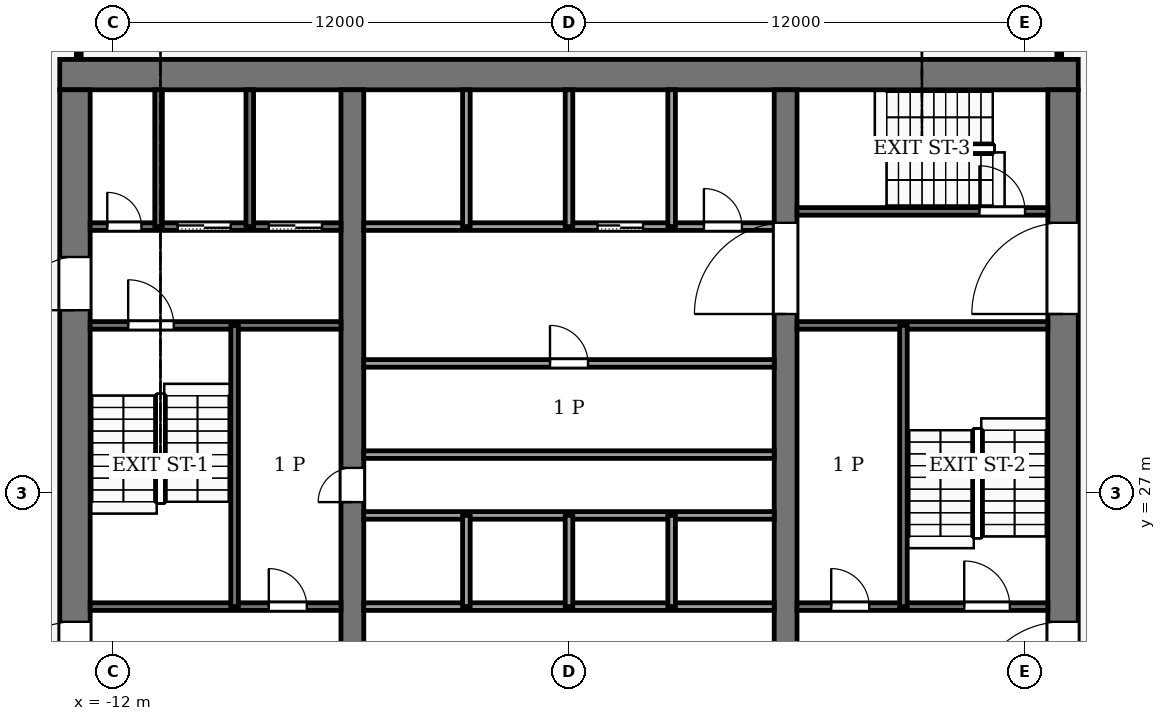
"""IFC4 building model, lengths in metres.
Left out: names, types, materials, properties, quantities, classifications, styles, units other than length and angle.
Written with IfcOpenShell. Run it as: python <this file> out.ifc"""

import sys

from ifc_helpers import new_model, si_unit, direction, frame, frame_2d, origin, place, context, subcontext, project, spatial, rectangle, extrude, element, fill, save


model = new_model("IFC4")
c1 = context("Model", 3, precision=1e-05, world=origin(), true_north=direction((0.0, 1.0)))
c2 = subcontext(c1, "Body", "Model", "MODEL_VIEW")
j1 = project(units=[si_unit("LENGTHUNIT", "METRE"), si_unit("PLANEANGLEUNIT", "RADIAN")], contexts=[c1])
p1 = place(None, origin())
s1 = spatial("IfcSite", under=j1, at=p1, CompositionType="ELEMENT")
p2 = place(p1, origin())
s2 = spatial("IfcBuilding", under=s1, at=p2, CompositionType="ELEMENT")
p3 = place(p2, frame((0.0, 0.0, 282.0)))
s3 = spatial("IfcBuildingStorey", under=s2, at=p3, CompositionType="ELEMENT", Elevation=282.0)
p4 = place(p3, frame((-13.4, 38.0, -0.25), z_axis=(0.0, 0.0, 1.0), x_axis=(1.0, 0.0, 0.0)))
e1 = element("IfcWall", 1, at=p4, inside=s3, PredefinedType="SHEAR", context=c2, shape_type="SweptSolid", body=[
    extrude(rectangle(XDim=26.8, YDim=0.8, at=frame_2d((13.4, 0.0))), origin(), (0.0, 0.0, 1.0), 7.12),
])
p5 = place(p3, frame((-13.0, 18.4, -0.25), z_axis=(0.0, 0.0, 1.0), x_axis=(0.0, 1.0, 0.0)))
e2 = element("IfcWall", 2, at=p5, inside=s3, PredefinedType="SHEAR", context=c2, shape_type="SweptSolid", body=[
    extrude(rectangle(XDim=19.2, YDim=0.8, at=frame_2d((9.6, 0.0))), origin(), (0.0, 0.0, 1.0), 7.12),
])
p6 = place(p5, frame((2.8, 0.0, 0.25)))
e3 = element("IfcOpeningElement", 3, at=p6, cuts=e2, PredefinedType="OPENING", context=c2, shape_type="SweptSolid", body=[
    extrude(rectangle(XDim=2.4, YDim=2.4, at=frame_2d((1.2, 1.2))), frame((0.0, 0.41, 0.0), z_axis=(0.0, -1.0, 0.0), x_axis=(1.0, 0.0, 0.0)), (0.0, 0.0, 1.0), 0.82),
])
p7 = place(p5, frame((13.4, 0.0, 0.25)))
e4 = element("IfcOpeningElement", 4, at=p7, cuts=e2, PredefinedType="OPENING", context=c2, shape_type="SweptSolid", body=[
    extrude(rectangle(XDim=1.4, YDim=2.2, at=frame_2d((0.7, 1.1))), frame((0.0, 0.41, 0.0), z_axis=(0.0, -1.0, 0.0), x_axis=(1.0, 0.0, 0.0)), (0.0, 0.0, 1.0), 0.82),
])
p8 = place(p3, frame((13.0, 18.4, -0.25), z_axis=(0.0, 0.0, 1.0), x_axis=(0.0, 1.0, 0.0)))
e5 = element("IfcWall", 5, at=p8, inside=s3, PredefinedType="SHEAR", context=c2, shape_type="SweptSolid", body=[
    extrude(rectangle(XDim=19.2, YDim=0.8, at=frame_2d((9.6, 0.0))), origin(), (0.0, 0.0, 1.0), 7.12),
])
p9 = place(p8, frame((2.8, 0.0, 0.25)))
e6 = element("IfcOpeningElement", 6, at=p9, cuts=e5, PredefinedType="OPENING", context=c2, shape_type="SweptSolid", body=[
    extrude(rectangle(XDim=2.4, YDim=2.4, at=frame_2d((1.2, 1.2))), frame((0.0, 0.41, 0.0), z_axis=(0.0, -1.0, 0.0), x_axis=(1.0, 0.0, 0.0)), (0.0, 0.0, 1.0), 0.82),
])
p10 = place(p8, frame((13.3, 0.0, 0.25)))
e7 = element("IfcOpeningElement", 7, at=p10, cuts=e5, PredefinedType="OPENING", context=c2, shape_type="SweptSolid", body=[
    extrude(rectangle(XDim=2.4, YDim=2.4, at=frame_2d((1.2, 1.2))), frame((0.0, 0.41, 0.0), z_axis=(0.0, -1.0, 0.0), x_axis=(1.0, 0.0, 0.0)), (0.0, 0.0, 1.0), 0.82),
])
p11 = place(p3, frame((-5.7, 18.4, -0.25), z_axis=(0.0, 0.0, 1.0), x_axis=(0.0, 1.0, 0.0)))
e8 = element("IfcWall", 8, at=p11, inside=s3, PredefinedType="SHEAR", context=c2, shape_type="SweptSolid", body=[
    extrude(rectangle(XDim=19.2, YDim=0.6, at=frame_2d((9.6, 0.0))), origin(), (0.0, 0.0, 1.0), 7.12),
])
p12 = place(p11, frame((8.35, 0.0, 0.25)))
e9 = element("IfcOpeningElement", 9, at=p12, cuts=e8, PredefinedType="OPENING", context=c2, shape_type="SweptSolid", body=[
    extrude(rectangle(XDim=0.9, YDim=2.1, at=frame_2d((0.45, 1.05))), frame((0.0, 0.31, 0.0), z_axis=(0.0, -1.0, 0.0), x_axis=(1.0, 0.0, 0.0)), (0.0, 0.0, 1.0), 0.62),
])
p13 = place(p3, frame((5.7, 18.4, -0.25), z_axis=(0.0, 0.0, 1.0), x_axis=(0.0, 1.0, 0.0)))
e10 = element("IfcWall", 10, at=p13, inside=s3, PredefinedType="SHEAR", context=c2, shape_type="SweptSolid", body=[
    extrude(rectangle(XDim=19.2, YDim=0.6, at=frame_2d((9.6, 0.0))), origin(), (0.0, 0.0, 1.0), 7.12),
])
p14 = place(p13, frame((13.3, 0.0, 0.25)))
e11 = element("IfcOpeningElement", 11, at=p14, cuts=e10, PredefinedType="OPENING", context=c2, shape_type="SweptSolid", body=[
    extrude(rectangle(XDim=2.4, YDim=2.4, at=frame_2d((1.2, 1.2))), frame((0.0, 0.31, 0.0), z_axis=(0.0, -1.0, 0.0), x_axis=(1.0, 0.0, 0.0)), (0.0, 0.0, 1.0), 0.62),
])
p15 = place(p3, frame((-12.6, 24.0, 0.0), z_axis=(0.0, 0.0, 1.0), x_axis=(1.0, 0.0, 0.0)))
e12 = element("IfcWall", 12, at=p15, inside=s3, PredefinedType="PARTITIONING", context=c2, shape_type="SweptSolid", body=[
    extrude(rectangle(XDim=6.6, YDim=0.2, at=frame_2d((3.3, 0.0))), origin(), (0.0, 0.0, 1.0), 6.87),
])
p16 = place(p15, frame((4.7, 0.0, 0.0)))
e13 = element("IfcOpeningElement", 13, at=p16, cuts=e12, PredefinedType="OPENING", context=c2, shape_type="SweptSolid", body=[
    extrude(rectangle(XDim=1.0, YDim=2.1, at=frame_2d((0.5, 1.05))), frame((0.0, 0.11, 0.0), z_axis=(0.0, -1.0, 0.0), x_axis=(1.0, 0.0, 0.0)), (0.0, 0.0, 1.0), 0.22),
])
p17 = place(p3, frame((-5.4, 24.0, 0.0), z_axis=(0.0, 0.0, 1.0), x_axis=(1.0, 0.0, 0.0)))
e14 = element("IfcWall", 14, at=p17, inside=s3, PredefinedType="PARTITIONING", context=c2, shape_type="SweptSolid", body=[
    extrude(rectangle(XDim=10.8, YDim=0.2, at=frame_2d((5.4, 0.0))), origin(), (0.0, 0.0, 1.0), 6.87),
])
p18 = place(p3, frame((6.0, 24.0, 0.0), z_axis=(0.0, 0.0, 1.0), x_axis=(1.0, 0.0, 0.0)))
e15 = element("IfcWall", 15, at=p18, inside=s3, PredefinedType="PARTITIONING", context=c2, shape_type="SweptSolid", body=[
    extrude(rectangle(XDim=6.6, YDim=0.2, at=frame_2d((3.3, 0.0))), origin(), (0.0, 0.0, 1.0), 6.87),
])
p19 = place(p18, frame((0.9, 0.0, 0.0)))
e16 = element("IfcOpeningElement", 16, at=p19, cuts=e15, PredefinedType="OPENING", context=c2, shape_type="SweptSolid", body=[
    extrude(rectangle(XDim=1.0, YDim=2.1, at=frame_2d((0.5, 1.05))), frame((0.0, 0.11, 0.0), z_axis=(0.0, -1.0, 0.0), x_axis=(1.0, 0.0, 0.0)), (0.0, 0.0, 1.0), 0.22),
])
p20 = place(p18, frame((4.4, 0.0, 0.0)))
e17 = element("IfcOpeningElement", 17, at=p20, cuts=e15, PredefinedType="OPENING", context=c2, shape_type="SweptSolid", body=[
    extrude(rectangle(XDim=1.2, YDim=2.2, at=frame_2d((0.6, 1.1))), frame((0.0, 0.11, 0.0), z_axis=(0.0, -1.0, 0.0), x_axis=(1.0, 0.0, 0.0)), (0.0, 0.0, 1.0), 0.22),
])
for number, where, z_axis, x_axis in (
    (18, (-5.4, 26.4, 0.0), (0.0, 0.0, 1.0), (1.0, 0.0, 0.0)),
    (19, (-5.4, 28.0, 0.0), (0.0, 0.0, 1.0), (1.0, 0.0, 0.0)),
):
    element("IfcWall", number, at=place(p3, frame(where, z_axis=z_axis, x_axis=x_axis)), inside=s3, PredefinedType="PARTITIONING", context=c2, shape_type="SweptSolid", body=[
        extrude(rectangle(XDim=10.8, YDim=0.2, at=frame_2d((5.4, 0.0))), origin(), (0.0, 0.0, 1.0), 6.87),
    ])
p21 = place(p3, frame((-5.4, 30.4, 0.0), z_axis=(0.0, 0.0, 1.0), x_axis=(1.0, 0.0, 0.0)))
e20 = element("IfcWall", 20, at=p21, inside=s3, PredefinedType="PARTITIONING", context=c2, shape_type="SweptSolid", body=[
    extrude(rectangle(XDim=10.8, YDim=0.2, at=frame_2d((5.4, 0.0))), origin(), (0.0, 0.0, 1.0), 6.87),
])
p22 = place(p21, frame((4.9, 0.0, 0.0)))
e21 = element("IfcOpeningElement", 21, at=p22, cuts=e20, PredefinedType="OPENING", context=c2, shape_type="SweptSolid", body=[
    extrude(rectangle(XDim=1.0, YDim=2.1, at=frame_2d((0.5, 1.05))), frame((0.0, 0.11, 0.0), z_axis=(0.0, -1.0, 0.0), x_axis=(1.0, 0.0, 0.0)), (0.0, 0.0, 1.0), 0.22),
])
p23 = place(p3, frame((-12.6, 31.4, 0.0), z_axis=(0.0, 0.0, 1.0), x_axis=(1.0, 0.0, 0.0)))
e22 = element("IfcWall", 22, at=p23, inside=s3, PredefinedType="PARTITIONING", context=c2, shape_type="SweptSolid", body=[
    extrude(rectangle(XDim=6.6, YDim=0.2, at=frame_2d((3.3, 0.0))), origin(), (0.0, 0.0, 1.0), 6.87),
])
p24 = place(p23, frame((1.0, 0.0, 0.0)))
e23 = element("IfcOpeningElement", 23, at=p24, cuts=e22, PredefinedType="OPENING", context=c2, shape_type="SweptSolid", body=[
    extrude(rectangle(XDim=1.2, YDim=2.2, at=frame_2d((0.6, 1.1))), frame((0.0, 0.11, 0.0), z_axis=(0.0, -1.0, 0.0), x_axis=(1.0, 0.0, 0.0)), (0.0, 0.0, 1.0), 0.22),
])
p25 = place(p3, frame((6.0, 31.4, 0.0), z_axis=(0.0, 0.0, 1.0), x_axis=(1.0, 0.0, 0.0)))
e24 = element("IfcWall", 24, at=p25, inside=s3, PredefinedType="PARTITIONING", context=c2, shape_type="SweptSolid", body=[
    extrude(rectangle(XDim=6.6, YDim=0.2, at=frame_2d((3.3, 0.0))), origin(), (0.0, 0.0, 1.0), 6.87),
])
p26 = place(p3, frame((-12.6, 34.0, 0.0), z_axis=(0.0, 0.0, 1.0), x_axis=(1.0, 0.0, 0.0)))
e25 = element("IfcWall", 25, at=p26, inside=s3, PredefinedType="PARTITIONING", context=c2, shape_type="SweptSolid", body=[
    extrude(rectangle(XDim=6.6, YDim=0.2, at=frame_2d((3.3, 0.0))), origin(), (0.0, 0.0, 1.0), 6.87),
])
p27 = place(p26, frame((4.7, 0.0, 0.0)))
e26 = element("IfcOpeningElement", 26, at=p27, cuts=e25, PredefinedType="OPENING", context=c2, shape_type="SweptSolid", body=[
    extrude(rectangle(XDim=1.4, YDim=2.2, at=frame_2d((0.7, 1.1))), frame((0.0, 0.11, 0.0), z_axis=(0.0, -1.0, 0.0), x_axis=(1.0, 0.0, 0.0)), (0.0, 0.0, 1.0), 0.22),
])
p28 = place(p26, frame((2.3, 0.0, 0.0)))
e27 = element("IfcOpeningElement", 27, at=p28, cuts=e25, PredefinedType="OPENING", context=c2, shape_type="SweptSolid", body=[
    extrude(rectangle(XDim=1.4, YDim=2.2, at=frame_2d((0.7, 1.1))), frame((0.0, 0.11, 0.0), z_axis=(0.0, -1.0, 0.0), x_axis=(1.0, 0.0, 0.0)), (0.0, 0.0, 1.0), 0.22),
])
p29 = place(p26, frame((0.45, 0.0, 0.0)))
e28 = element("IfcOpeningElement", 28, at=p29, cuts=e25, PredefinedType="OPENING", context=c2, shape_type="SweptSolid", body=[
    extrude(rectangle(XDim=0.9, YDim=2.1, at=frame_2d((0.45, 1.05))), frame((0.0, 0.11, 0.0), z_axis=(0.0, -1.0, 0.0), x_axis=(1.0, 0.0, 0.0)), (0.0, 0.0, 1.0), 0.22),
])
p30 = place(p3, frame((-5.4, 34.0, 0.0), z_axis=(0.0, 0.0, 1.0), x_axis=(1.0, 0.0, 0.0)))
e29 = element("IfcWall", 29, at=p30, inside=s3, PredefinedType="PARTITIONING", context=c2, shape_type="SweptSolid", body=[
    extrude(rectangle(XDim=10.8, YDim=0.2, at=frame_2d((5.4, 0.0))), origin(), (0.0, 0.0, 1.0), 6.87),
])
p31 = place(p30, frame((6.15, 0.0, 0.0)))
e30 = element("IfcOpeningElement", 30, at=p31, cuts=e29, PredefinedType="OPENING", context=c2, shape_type="SweptSolid", body=[
    extrude(rectangle(XDim=1.2, YDim=2.2, at=frame_2d((0.6, 1.1))), frame((0.0, 0.11, 0.0), z_axis=(0.0, -1.0, 0.0), x_axis=(1.0, 0.0, 0.0)), (0.0, 0.0, 1.0), 0.22),
])
p32 = place(p30, frame((8.95, 0.0, 0.0)))
e31 = element("IfcOpeningElement", 31, at=p32, cuts=e29, PredefinedType="OPENING", context=c2, shape_type="SweptSolid", body=[
    extrude(rectangle(XDim=1.0, YDim=2.1, at=frame_2d((0.5, 1.05))), frame((0.0, 0.11, 0.0), z_axis=(0.0, -1.0, 0.0), x_axis=(1.0, 0.0, 0.0)), (0.0, 0.0, 1.0), 0.22),
])
p33 = place(p3, frame((6.0, 34.4, 0.0), z_axis=(0.0, 0.0, 1.0), x_axis=(1.0, 0.0, 0.0)))
e32 = element("IfcWall", 32, at=p33, inside=s3, PredefinedType="PARTITIONING", context=c2, shape_type="SweptSolid", body=[
    extrude(rectangle(XDim=6.6, YDim=0.2, at=frame_2d((3.3, 0.0))), origin(), (0.0, 0.0, 1.0), 6.87),
])
p34 = place(p33, frame((4.8, 0.0, 0.0)))
e33 = element("IfcOpeningElement", 33, at=p34, cuts=e32, PredefinedType="OPENING", context=c2, shape_type="SweptSolid", body=[
    extrude(rectangle(XDim=1.2, YDim=2.2, at=frame_2d((0.6, 1.1))), frame((0.0, 0.11, 0.0), z_axis=(0.0, -1.0, 0.0), x_axis=(1.0, 0.0, 0.0)), (0.0, 0.0, 1.0), 0.22),
])
p35 = place(p3, frame((-10.8, 34.0, 0.0), z_axis=(0.0, 0.0, 1.0), x_axis=(0.0, 1.0, 0.0)))
e34 = element("IfcWall", 34, at=p35, inside=s3, PredefinedType="PARTITIONING", context=c2, shape_type="SweptSolid", body=[
    extrude(rectangle(XDim=3.6, YDim=0.2, at=frame_2d((1.8, 0.0))), origin(), (0.0, 0.0, 1.0), 6.87),
])
p36 = place(p3, frame((-8.8, 24.0, 0.0), z_axis=(0.0, 0.0, 1.0), x_axis=(0.0, 1.0, 0.0)))
e35 = element("IfcWall", 35, at=p36, inside=s3, PredefinedType="PARTITIONING", context=c2, shape_type="SweptSolid", body=[
    extrude(rectangle(XDim=7.4, YDim=0.2, at=frame_2d((3.7, 0.0))), origin(), (0.0, 0.0, 1.0), 6.87),
])
p37 = place(p3, frame((-8.4, 34.0, 0.0), z_axis=(0.0, 0.0, 1.0), x_axis=(0.0, 1.0, 0.0)))
e36 = element("IfcWall", 36, at=p37, inside=s3, PredefinedType="PARTITIONING", context=c2, shape_type="SweptSolid", body=[
    extrude(rectangle(XDim=3.6, YDim=0.2, at=frame_2d((1.8, 0.0))), origin(), (0.0, 0.0, 1.0), 6.87),
])
p38 = place(p3, frame((-2.7, 24.0, 0.0), z_axis=(0.0, 0.0, 1.0), x_axis=(0.0, 1.0, 0.0)))
e37 = element("IfcWall", 37, at=p38, inside=s3, PredefinedType="PARTITIONING", context=c2, shape_type="SweptSolid", body=[
    extrude(rectangle(XDim=2.4, YDim=0.2, at=frame_2d((1.2, 0.0))), origin(), (0.0, 0.0, 1.0), 6.87),
])
p39 = place(p3, frame((-2.7, 34.0, 0.0), z_axis=(0.0, 0.0, 1.0), x_axis=(0.0, 1.0, 0.0)))
e38 = element("IfcWall", 38, at=p39, inside=s3, PredefinedType="PARTITIONING", context=c2, shape_type="SweptSolid", body=[
    extrude(rectangle(XDim=3.6, YDim=0.2, at=frame_2d((1.8, 0.0))), origin(), (0.0, 0.0, 1.0), 6.87),
])
p40 = place(p3, frame((0.0, 24.0, 0.0), z_axis=(0.0, 0.0, 1.0), x_axis=(0.0, 1.0, 0.0)))
e39 = element("IfcWall", 39, at=p40, inside=s3, PredefinedType="PARTITIONING", context=c2, shape_type="SweptSolid", body=[
    extrude(rectangle(XDim=2.4, YDim=0.2, at=frame_2d((1.2, 0.0))), origin(), (0.0, 0.0, 1.0), 6.87),
])
p41 = place(p3, frame((0.0, 34.0, 0.0), z_axis=(0.0, 0.0, 1.0), x_axis=(0.0, 1.0, 0.0)))
e40 = element("IfcWall", 40, at=p41, inside=s3, PredefinedType="PARTITIONING", context=c2, shape_type="SweptSolid", body=[
    extrude(rectangle(XDim=3.6, YDim=0.2, at=frame_2d((1.8, 0.0))), origin(), (0.0, 0.0, 1.0), 6.87),
])
p42 = place(p3, frame((2.7, 24.0, 0.0), z_axis=(0.0, 0.0, 1.0), x_axis=(0.0, 1.0, 0.0)))
e41 = element("IfcWall", 41, at=p42, inside=s3, PredefinedType="PARTITIONING", context=c2, shape_type="SweptSolid", body=[
    extrude(rectangle(XDim=2.4, YDim=0.2, at=frame_2d((1.2, 0.0))), origin(), (0.0, 0.0, 1.0), 6.87),
])
p43 = place(p3, frame((2.7, 34.0, 0.0), z_axis=(0.0, 0.0, 1.0), x_axis=(0.0, 1.0, 0.0)))
e42 = element("IfcWall", 42, at=p43, inside=s3, PredefinedType="PARTITIONING", context=c2, shape_type="SweptSolid", body=[
    extrude(rectangle(XDim=3.6, YDim=0.2, at=frame_2d((1.8, 0.0))), origin(), (0.0, 0.0, 1.0), 6.87),
])
p44 = place(p3, frame((8.8, 24.0, 0.0), z_axis=(0.0, 0.0, 1.0), x_axis=(0.0, 1.0, 0.0)))
e43 = element("IfcWall", 43, at=p44, inside=s3, PredefinedType="PARTITIONING", context=c2, shape_type="SweptSolid", body=[
    extrude(rectangle(XDim=7.4, YDim=0.2, at=frame_2d((3.7, 0.0))), origin(), (0.0, 0.0, 1.0), 6.87),
])
for number, where, z_axis, x_axis in (
    (44, (12.9, 38.45, 0.0), (0.0, 0.0, 1.0), (0.0, 1.0, 0.0)),
    (45, (-12.9, 66.958, 0.0), (0.0, 0.0, 1.0), (0.0, -1.0, 0.0)),
):
    element("IfcWall", number, at=place(p3, frame(where, z_axis=z_axis, x_axis=x_axis)), inside=s3, PredefinedType="PARTITIONING", context=c2, shape_type="SweptSolid", body=[
        extrude(rectangle(XDim=28.508, YDim=0.125, at=frame_2d((14.254, 0.0))), origin(), (0.0, 0.0, 1.0), 6.35),
    ])
p45 = place(p31, origin())
e46 = element("IfcDoor", 46, at=p45, inside=s3, OperationType="SLIDING_TO_LEFT", PredefinedType="DOOR", context=c2, shape_type="SweptSolid", body=[
    extrude(rectangle(XDim=1.2, YDim=2.2, at=frame_2d((0.6, 1.1))), frame((0.0, 0.025, 0.0), z_axis=(0.0, -1.0, 0.0), x_axis=(1.0, 0.0, 0.0)), (0.0, 0.0, 1.0), 0.05),
])
fill(e30, e46)
p46 = place(p27, origin())
e47 = element("IfcDoor", 47, at=p46, inside=s3, OperationType="SLIDING_TO_LEFT", PredefinedType="DOOR", context=c2, shape_type="SweptSolid", body=[
    extrude(rectangle(XDim=1.4, YDim=2.2, at=frame_2d((0.7, 1.1))), frame((0.0, 0.025, 0.0), z_axis=(0.0, -1.0, 0.0), x_axis=(1.0, 0.0, 0.0)), (0.0, 0.0, 1.0), 0.05),
])
fill(e26, e47)
p47 = place(p28, origin())
e48 = element("IfcDoor", 48, at=p47, inside=s3, OperationType="SLIDING_TO_LEFT", PredefinedType="DOOR", context=c2, shape_type="SweptSolid", body=[
    extrude(rectangle(XDim=1.4, YDim=2.2, at=frame_2d((0.7, 1.1))), frame((0.0, 0.025, 0.0), z_axis=(0.0, -1.0, 0.0), x_axis=(1.0, 0.0, 0.0)), (0.0, 0.0, 1.0), 0.05),
])
fill(e27, e48)
p48 = place(p29, origin())
e49 = element("IfcDoor", 49, at=p48, inside=s3, OperationType="SINGLE_SWING_RIGHT", PredefinedType="DOOR", context=c2, shape_type="SweptSolid", body=[
    extrude(rectangle(XDim=0.9, YDim=2.1, at=frame_2d((0.45, 1.05))), frame((0.0, 0.025, 0.0), z_axis=(0.0, -1.0, 0.0), x_axis=(1.0, 0.0, 0.0)), (0.0, 0.0, 1.0), 0.05),
])
fill(e28, e49)
p49 = place(p22, origin())
e50 = element("IfcDoor", 50, at=p49, inside=s3, OperationType="SINGLE_SWING_RIGHT", PredefinedType="DOOR", context=c2, shape_type="SweptSolid", body=[
    extrude(rectangle(XDim=1.0, YDim=2.1, at=frame_2d((0.5, 1.05))), frame((0.0, 0.025, 0.0), z_axis=(0.0, -1.0, 0.0), x_axis=(1.0, 0.0, 0.0)), (0.0, 0.0, 1.0), 0.05),
])
fill(e21, e50)
p50 = place(p16, origin())
e51 = element("IfcDoor", 51, at=p50, inside=s3, OperationType="SINGLE_SWING_LEFT", PredefinedType="DOOR", context=c2, shape_type="SweptSolid", body=[
    extrude(rectangle(XDim=1.0, YDim=2.1, at=frame_2d((0.5, 1.05))), frame((0.0, 0.025, 0.0), z_axis=(0.0, -1.0, 0.0), x_axis=(1.0, 0.0, 0.0)), (0.0, 0.0, 1.0), 0.05),
])
fill(e13, e51)
p51 = place(p19, origin())
e52 = element("IfcDoor", 52, at=p51, inside=s3, OperationType="SINGLE_SWING_RIGHT", PredefinedType="DOOR", context=c2, shape_type="SweptSolid", body=[
    extrude(rectangle(XDim=1.0, YDim=2.1, at=frame_2d((0.5, 1.05))), frame((0.0, 0.025, 0.0), z_axis=(0.0, -1.0, 0.0), x_axis=(1.0, 0.0, 0.0)), (0.0, 0.0, 1.0), 0.05),
])
fill(e16, e52)
p52 = place(p32, origin())
e53 = element("IfcDoor", 53, at=p52, inside=s3, OperationType="SINGLE_SWING_LEFT", PredefinedType="DOOR", context=c2, shape_type="SweptSolid", body=[
    extrude(rectangle(XDim=1.0, YDim=2.1, at=frame_2d((0.5, 1.05))), frame((0.0, 0.025, 0.0), z_axis=(0.0, -1.0, 0.0), x_axis=(1.0, 0.0, 0.0)), (0.0, 0.0, 1.0), 0.05),
])
fill(e31, e53)
p53 = place(p12, origin())
e54 = element("IfcDoor", 54, at=p53, inside=s3, OperationType="SINGLE_SWING_LEFT", PredefinedType="DOOR", context=c2, shape_type="SweptSolid", body=[
    extrude(rectangle(XDim=0.9, YDim=2.1, at=frame_2d((0.45, 1.05))), frame((0.0, 0.025, 0.0), z_axis=(0.0, -1.0, 0.0), x_axis=(1.0, 0.0, 0.0)), (0.0, 0.0, 1.0), 0.05),
])
fill(e9, e54)
p54 = place(p24, origin())
e55 = element("IfcDoor", 55, at=p54, inside=s3, OperationType="SINGLE_SWING_LEFT", PredefinedType="DOOR", context=c2, shape_type="SweptSolid", body=[
    extrude(rectangle(XDim=1.2, YDim=2.2, at=frame_2d((0.6, 1.1))), frame((0.0, 0.025, 0.0), z_axis=(0.0, -1.0, 0.0), x_axis=(1.0, 0.0, 0.0)), (0.0, 0.0, 1.0), 0.05),
])
fill(e23, e55)
p55 = place(p20, origin())
e56 = element("IfcDoor", 56, at=p55, inside=s3, OperationType="SINGLE_SWING_RIGHT", PredefinedType="DOOR", context=c2, shape_type="SweptSolid", body=[
    extrude(rectangle(XDim=1.2, YDim=2.2, at=frame_2d((0.6, 1.1))), frame((0.0, 0.025, 0.0), z_axis=(0.0, -1.0, 0.0), x_axis=(1.0, 0.0, 0.0)), (0.0, 0.0, 1.0), 0.05),
])
fill(e17, e56)
p56 = place(p34, origin())
e57 = element("IfcDoor", 57, at=p56, inside=s3, OperationType="SINGLE_SWING_LEFT", PredefinedType="DOOR", context=c2, shape_type="SweptSolid", body=[
    extrude(rectangle(XDim=1.2, YDim=2.2, at=frame_2d((0.6, 1.1))), frame((0.0, 0.025, 0.0), z_axis=(0.0, -1.0, 0.0), x_axis=(1.0, 0.0, 0.0)), (0.0, 0.0, 1.0), 0.05),
])
fill(e33, e57)
p57 = place(p14, origin())
e58 = element("IfcDoor", 58, at=p57, inside=s3, OperationType="DOUBLE_DOOR_SINGLE_SWING", PredefinedType="DOOR", context=c2, shape_type="SweptSolid", body=[
    extrude(rectangle(XDim=2.4, YDim=2.4, at=frame_2d((1.2, 1.2))), frame((0.0, 0.025, 0.0), z_axis=(0.0, -1.0, 0.0), x_axis=(1.0, 0.0, 0.0)), (0.0, 0.0, 1.0), 0.05),
])
fill(e11, e58)
p58 = place(p6, origin())
e59 = element("IfcDoor", 59, at=p58, inside=s3, OperationType="DOUBLE_DOOR_SINGLE_SWING", PredefinedType="DOOR", context=c2, shape_type="SweptSolid", body=[
    extrude(rectangle(XDim=2.4, YDim=2.4, at=frame_2d((1.2, 1.2))), frame((0.0, 0.025, 0.0), z_axis=(0.0, -1.0, 0.0), x_axis=(1.0, 0.0, 0.0)), (0.0, 0.0, 1.0), 0.05),
])
fill(e3, e59)
p59 = place(p9, origin())
e60 = element("IfcDoor", 60, at=p59, inside=s3, OperationType="DOUBLE_DOOR_SINGLE_SWING", PredefinedType="DOOR", context=c2, shape_type="SweptSolid", body=[
    extrude(rectangle(XDim=2.4, YDim=2.4, at=frame_2d((1.2, 1.2))), frame((0.0, 0.025, 0.0), z_axis=(0.0, -1.0, 0.0), x_axis=(1.0, 0.0, 0.0)), (0.0, 0.0, 1.0), 0.05),
])
fill(e6, e60)
p60 = place(p10, origin())
e61 = element("IfcDoor", 61, at=p60, inside=s3, OperationType="DOUBLE_DOOR_SINGLE_SWING", PredefinedType="DOOR", context=c2, shape_type="SweptSolid", body=[
    extrude(rectangle(XDim=2.4, YDim=2.4, at=frame_2d((1.2, 1.2))), frame((0.0, 0.025, 0.0), z_axis=(0.0, -1.0, 0.0), x_axis=(1.0, 0.0, 0.0)), (0.0, 0.0, 1.0), 0.05),
])
fill(e7, e61)
p61 = place(p7, origin())
e62 = element("IfcDoor", 62, at=p61, inside=s3, OperationType="SINGLE_SWING_LEFT", PredefinedType="DOOR", context=c2, shape_type="SweptSolid", body=[
    extrude(rectangle(XDim=1.4, YDim=2.2, at=frame_2d((0.7, 1.1))), frame((0.0, 0.025, 0.0), z_axis=(0.0, -1.0, 0.0), x_axis=(1.0, 0.0, 0.0)), (0.0, 0.0, 1.0), 0.05),
])
fill(e4, e62)
save(model, sys.argv[1])
